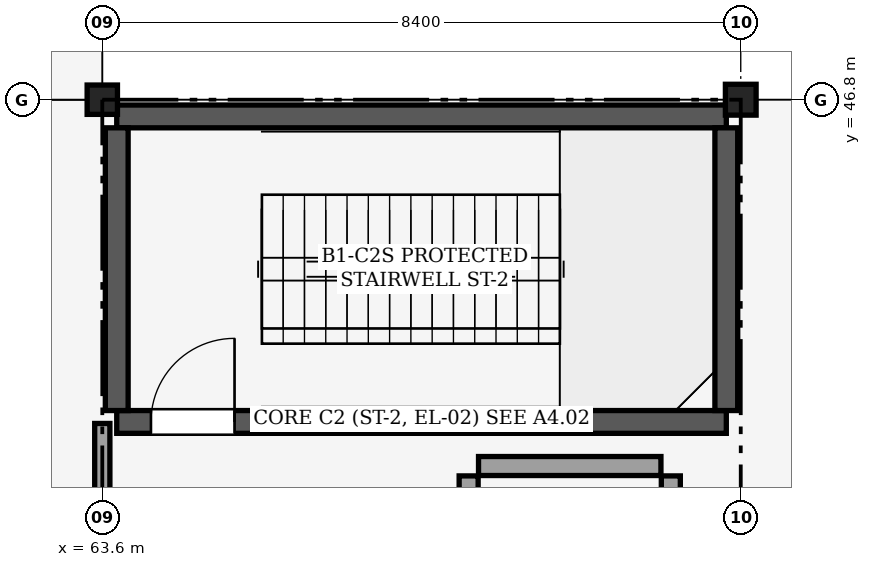
"""IFC4 building model, lengths in metres.
Left out: names, types, materials, properties, quantities, classifications, styles, units other than length and angle.
Written with IfcOpenShell. Run it as: python <this file> out.ifc"""

import sys

from ifc_helpers import new_model, si_unit, direction, frame, frame_2d, origin, origin_2d, place, context, subcontext, project, spatial, rectangle, i_section, extrude, element, fill, save


model = new_model("IFC4")
c1 = context("Model", 3, precision=1e-05, world=origin(), true_north=direction((0.0, 1.0)))
c2 = subcontext(c1, "Body", "Model", "MODEL_VIEW")
j1 = project(units=[si_unit("LENGTHUNIT", "METRE"), si_unit("PLANEANGLEUNIT", "RADIAN")], contexts=[c1])
p1 = place(None, origin())
s1 = spatial("IfcSite", under=j1, at=p1, CompositionType="ELEMENT")
p2 = place(p1, origin())
s2 = spatial("IfcBuilding", under=s1, at=p2, CompositionType="ELEMENT")
p3 = place(p2, frame((0.0, 0.0, -5.4)))
s3 = spatial("IfcBuildingStorey", under=s2, at=p3, CompositionType="ELEMENT", Elevation=-5.4)
p4 = place(p3, frame((63.6, 46.8, 0.0), z_axis=(0.0, 0.0, 1.0), x_axis=(1.0, 0.0, 0.0)))
e1 = element("IfcColumn", 1, at=p4, inside=s3, PredefinedType="COLUMN", context=c2, shape_type="SweptSolid", body=[
    extrude(i_section(OverallWidth=0.399, OverallDepth=0.386, WebThickness=0.021, FlangeThickness=0.033, FilletRadius=0.025, at=origin_2d()), origin(), (0.0, 0.0, 1.0), 5.4),
])
p5 = place(p3, frame((72.0, 46.8, 0.0), z_axis=(0.0, 0.0, 1.0), x_axis=(1.0, 0.0, 0.0)))
e2 = element("IfcColumn", 2, at=p5, inside=s3, PredefinedType="COLUMN", context=c2, shape_type="SweptSolid", body=[
    extrude(i_section(OverallWidth=0.404, OverallDepth=0.406, WebThickness=0.027, FlangeThickness=0.044, FilletRadius=0.025, at=origin_2d()), origin(), (0.0, 0.0, 1.0), 5.4),
])
p6 = place(p3, frame((63.79, 42.56, 0.0), z_axis=(0.0, 0.0, 1.0), x_axis=(1.0, 0.0, 0.0)))
e3 = element("IfcWall", 3, at=p6, inside=s3, PredefinedType="SHEAR", context=c2, shape_type="SweptSolid", body=[
    extrude(rectangle(XDim=8.02, YDim=0.3, at=frame_2d((4.01, 0.0))), origin(), (0.0, 0.0, 1.0), 5.12),
])
p7 = place(p6, frame((0.45, 0.0, 0.0)))
e4 = element("IfcOpeningElement", 4, at=p7, cuts=e3, PredefinedType="OPENING", context=c2, shape_type="SweptSolid", body=[
    extrude(rectangle(XDim=1.1, YDim=2.15, at=frame_2d((0.55, 1.075))), frame((0.0, 0.16, 0.0), z_axis=(0.0, -1.0, 0.0), x_axis=(1.0, 0.0, 0.0)), (0.0, 0.0, 1.0), 0.321),
])
p8 = place(p3, frame((63.79, 46.58, 0.0), z_axis=(0.0, 0.0, 1.0), x_axis=(1.0, 0.0, 0.0)))
e5 = element("IfcWall", 5, at=p8, inside=s3, PredefinedType="SHEAR", context=c2, shape_type="SweptSolid", body=[
    extrude(rectangle(XDim=8.02, YDim=0.3, at=frame_2d((4.01, 0.0))), origin(), (0.0, 0.0, 1.0), 5.12),
])
for number, where, z_axis, x_axis in (
    (6, (63.79, 42.71, 0.0), (0.0, 0.0, 1.0), (0.0, 1.0, 0.0)),
    (7, (71.81, 42.71, 0.0), (0.0, 0.0, 1.0), (0.0, 1.0, 0.0)),
):
    element("IfcWall", number, at=place(p3, frame(where, z_axis=z_axis, x_axis=x_axis)), inside=s3, PredefinedType="SHEAR", context=c2, shape_type="SweptSolid", body=[
        extrude(rectangle(XDim=3.72, YDim=0.3, at=frame_2d((1.86, 0.0))), origin(), (0.0, 0.0, 1.0), 5.12),
    ])
p9 = place(p3, frame((71.08, 38.85, 0.0), z_axis=(0.0, 0.0, 1.0), x_axis=(0.0, 1.0, 0.0)))
e8 = element("IfcWall", 8, at=p9, inside=s3, PredefinedType="PARTITIONING", context=c2, shape_type="SweptSolid", body=[
    extrude(rectangle(XDim=3.0, YDim=0.25, at=frame_2d((1.5, 0.0))), origin(), (0.0, 0.0, 1.0), 5.12),
])
p10 = place(p3, frame((68.55, 41.98, 0.0), z_axis=(0.0, 0.0, 1.0), x_axis=(1.0, 0.0, 0.0)))
e9 = element("IfcWall", 9, at=p10, inside=s3, PredefinedType="PARTITIONING", context=c2, shape_type="SweptSolid", body=[
    extrude(rectangle(XDim=2.4, YDim=0.25, at=frame_2d((1.2, 0.0))), origin(), (0.0, 0.0, 1.0), 5.12),
])
p11 = place(p3, frame((68.42, 38.5, 0.0), z_axis=(0.0, 0.0, 1.0), x_axis=(0.0, 1.0, 0.0)))
e10 = element("IfcWall", 10, at=p11, inside=s3, PredefinedType="PARTITIONING", context=c2, shape_type="SweptSolid", body=[
    extrude(rectangle(XDim=3.35, YDim=0.25, at=frame_2d((1.675, 0.0))), origin(), (0.0, 0.0, 1.0), 5.12),
])
p12 = place(p11, frame((0.85, 0.0, 0.0)))
e11 = element("IfcOpeningElement", 11, at=p12, cuts=e10, PredefinedType="OPENING", context=c2, shape_type="SweptSolid", body=[
    extrude(rectangle(XDim=1.25, YDim=2.15, at=frame_2d((0.625, 1.075))), frame((0.0, 0.135, 0.0), z_axis=(0.0, -1.0, 0.0), x_axis=(1.0, 0.0, 0.0)), (0.0, 0.0, 1.0), 0.271),
])
p13 = place(p3, frame((63.6, 38.62, 0.0), z_axis=(0.0, 0.0, 1.0), x_axis=(0.0, 1.0, 0.0)))
e12 = element("IfcWall", 12, at=p13, inside=s3, PredefinedType="PARTITIONING", context=c2, shape_type="SweptSolid", body=[
    extrude(rectangle(XDim=3.92, YDim=0.2, at=frame_2d((1.96, 0.0))), origin(), (0.0, 0.0, 1.0), 4.173),
])
p14 = place(p7, origin())
e13 = element("IfcDoor", 13, at=p14, inside=s3, OperationType="SINGLE_SWING_RIGHT", PredefinedType="DOOR", context=c2, shape_type="SweptSolid", body=[
    extrude(rectangle(XDim=1.1, YDim=2.15, at=frame_2d((0.55, 1.075))), frame((0.0, 0.025, 0.0), z_axis=(0.0, -1.0, 0.0), x_axis=(1.0, 0.0, 0.0)), (0.0, 0.0, 1.0), 0.05),
])
fill(e4, e13)
save(model, sys.argv[1])
